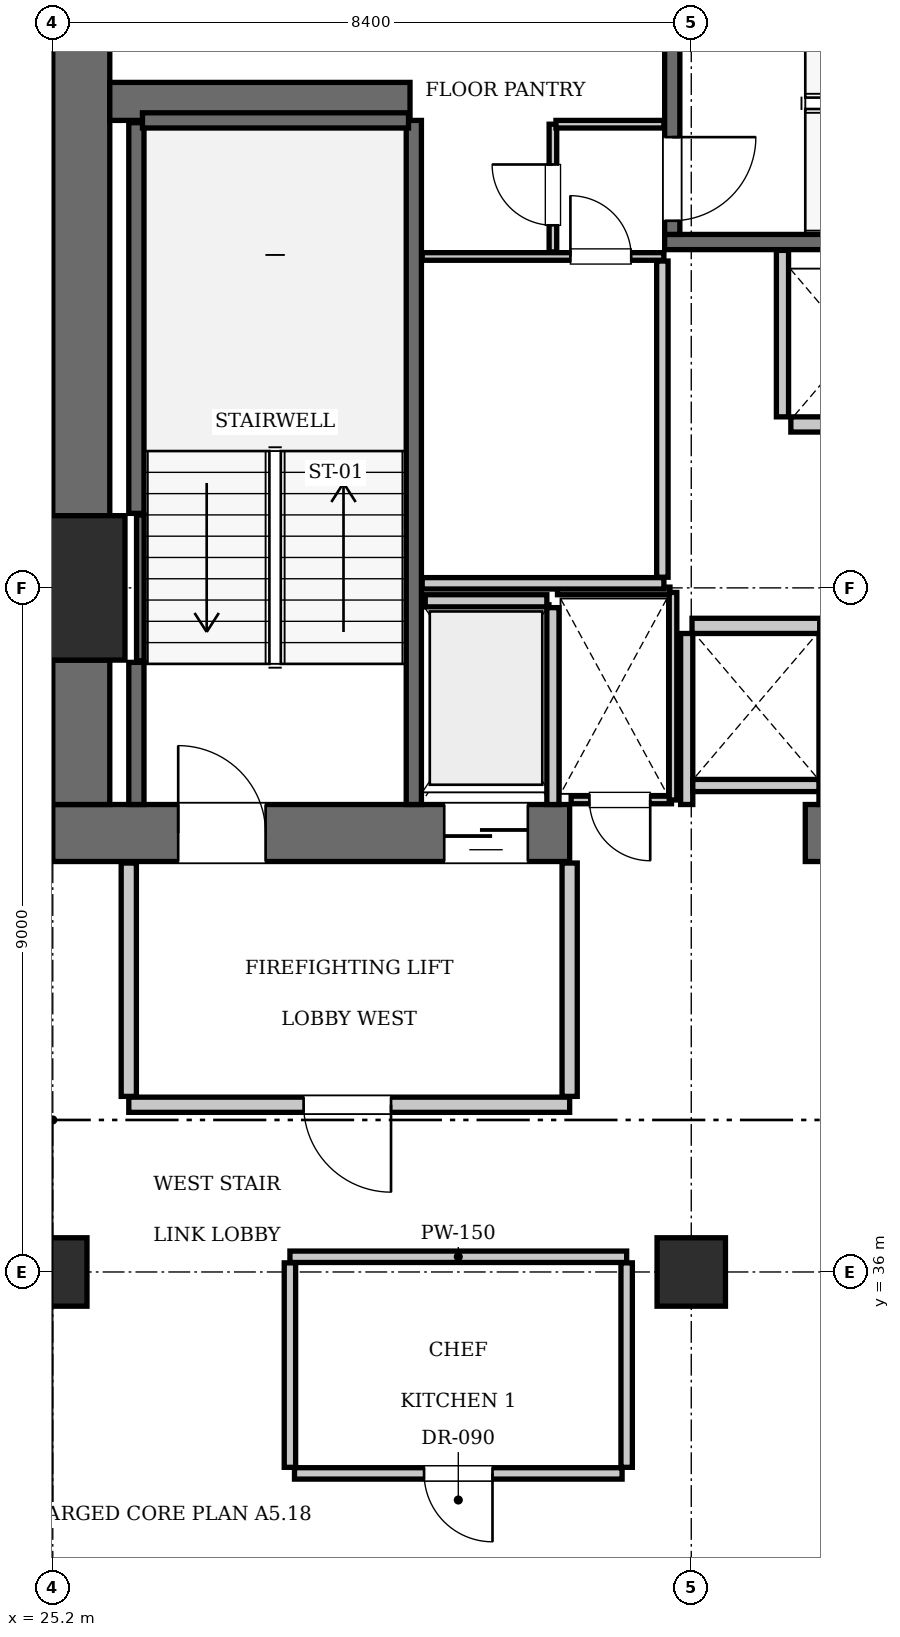
"""IFC4 building model, lengths in metres.
Left out: names, types, materials, properties, quantities, classifications, styles, units other than length and angle.
Written with IfcOpenShell. Run it as: python <this file> out.ifc"""

import sys

from ifc_helpers import new_model, si_unit, direction, frame, frame_2d, origin, origin_2d, place, context, subcontext, project, spatial, rectangle, extrude, element, fill, save


model = new_model("IFC4")
c1 = context("Model", 3, precision=1e-05, world=origin(), true_north=direction((0.0, 1.0)))
c2 = subcontext(c1, "Body", "Model", "MODEL_VIEW")
j1 = project(units=[si_unit("LENGTHUNIT", "METRE"), si_unit("PLANEANGLEUNIT", "RADIAN")], contexts=[c1])
p1 = place(None, origin())
s1 = spatial("IfcSite", under=j1, at=p1, CompositionType="ELEMENT")
p2 = place(p1, origin())
s2 = spatial("IfcBuilding", under=s1, at=p2, CompositionType="ELEMENT")
p3 = place(p2, frame((0.0, 0.0, 165.9)))
s3 = spatial("IfcBuildingStorey", under=s2, at=p3, CompositionType="ELEMENT", Elevation=165.9)
p4 = place(p3, frame((25.2, 45.0, 0.0), z_axis=(0.0, 0.0, 1.0), x_axis=(1.0, 0.0, 0.0)))
e1 = element("IfcColumn", 1, at=p4, inside=s3, PredefinedType="COLUMN", context=c2, shape_type="SweptSolid", body=[
    extrude(rectangle(XDim=1.9, YDim=1.9, at=origin_2d()), origin(), (0.0, 0.0, 1.0), 3.85),
])
p5 = place(p3, frame((25.2, 41.775, 0.0), z_axis=(0.0, 0.0, 1.0), x_axis=(1.0, 0.0, 0.0)))
e2 = element("IfcWall", 2, at=p5, inside=s3, PredefinedType="SHEAR", context=c2, shape_type="SweptSolid", body=[
    extrude(rectangle(XDim=6.8, YDim=0.75, at=frame_2d((3.4, 0.0))), origin(), (0.0, 0.0, 1.0), 3.85),
])
p6 = place(p5, frame((1.65, 0.0, 0.0)))
e3 = element("IfcOpeningElement", 3, at=p6, cuts=e2, PredefinedType="OPENING", context=c2, shape_type="SweptSolid", body=[
    extrude(rectangle(XDim=1.15, YDim=2.15, at=frame_2d((0.575, 1.075))), frame((0.0, 0.385, 0.0), z_axis=(0.0, -1.0, 0.0), x_axis=(1.0, 0.0, 0.0)), (0.0, 0.0, 1.0), 0.77),
])
p7 = place(p5, frame((5.15, 0.0, 0.0)))
e4 = element("IfcOpeningElement", 4, at=p7, cuts=e2, PredefinedType="OPENING", context=c2, shape_type="SweptSolid", body=[
    extrude(rectangle(XDim=1.1, YDim=2.2, at=frame_2d((0.55, 1.1))), frame((0.0, 0.385, 0.0), z_axis=(0.0, -1.0, 0.0), x_axis=(1.0, 0.0, 0.0)), (0.0, 0.0, 1.0), 0.77),
])
p8 = place(p3, frame((35.1, 41.775, 0.0), z_axis=(0.0, 0.0, 1.0), x_axis=(1.0, 0.0, 0.0)))
e5 = element("IfcWall", 5, at=p8, inside=s3, PredefinedType="SHEAR", context=c2, shape_type="SweptSolid", body=[
    extrude(rectangle(XDim=5.4, YDim=0.75, at=frame_2d((2.7, 0.0))), origin(), (0.0, 0.0, 1.0), 3.85),
])
p9 = place(p3, frame((25.575, 42.15, 0.0), z_axis=(0.0, 0.0, 1.0), x_axis=(0.0, 1.0, 0.0)))
e6 = element("IfcWall", 6, at=p9, inside=s3, PredefinedType="SHEAR", context=c2, shape_type="SweptSolid", body=[
    extrude(rectangle(XDim=1.9, YDim=0.75, at=frame_2d((0.95, 0.0))), origin(), (0.0, 0.0, 1.0), 3.85),
])
p10 = place(p3, frame((25.575, 45.95, 0.0), z_axis=(0.0, 0.0, 1.0), x_axis=(0.0, 1.0, 0.0)))
e7 = element("IfcWall", 7, at=p10, inside=s3, PredefinedType="SHEAR", context=c2, shape_type="SweptSolid", body=[
    extrude(rectangle(XDim=7.3, YDim=0.75, at=frame_2d((3.65, 0.0))), origin(), (0.0, 0.0, 1.0), 3.85),
])
p11 = place(p3, frame((25.95, 51.4, 0.0), z_axis=(0.0, 0.0, 1.0), x_axis=(1.0, 0.0, 0.0)))
e8 = element("IfcWall", 8, at=p11, inside=s3, PredefinedType="SHEAR", context=c2, shape_type="SweptSolid", body=[
    extrude(rectangle(XDim=3.95, YDim=0.5, at=frame_2d((1.975, 0.0))), origin(), (0.0, 0.0, 1.0), 3.85),
])
for number, where, z_axis, x_axis in (
    (9, (25.2, 36.0, 0.0), (0.0, 0.0, 1.0), (1.0, 0.0, 0.0)),
    (10, (33.6, 36.0, 0.0), (0.0, 0.0, 1.0), (1.0, 0.0, 0.0)),
):
    element("IfcColumn", number, at=place(p3, frame(where, z_axis=z_axis, x_axis=x_axis)), inside=s3, PredefinedType="COLUMN", context=c2, shape_type="SweptSolid", body=[
        extrude(rectangle(XDim=0.9, YDim=0.9, at=origin_2d()), origin(), (0.0, 0.0, 1.0), 3.85),
    ])
p12 = place(p3, frame((29.95, 42.15, 0.0), z_axis=(0.0, 0.0, 1.0), x_axis=(0.0, 1.0, 0.0)))
e11 = element("IfcWall", 11, at=p12, inside=s3, PredefinedType="SOLIDWALL", context=c2, shape_type="SweptSolid", body=[
    extrude(rectangle(XDim=9.0, YDim=0.2, at=frame_2d((4.5, 0.0))), origin(), (0.0, 0.0, 1.0), 3.61),
])
p13 = place(p3, frame((26.3, 42.15, 0.0), z_axis=(0.0, 0.0, 1.0), x_axis=(0.0, 1.0, 0.0)))
e12 = element("IfcWall", 12, at=p13, inside=s3, PredefinedType="SOLIDWALL", context=c2, shape_type="SweptSolid", body=[
    extrude(rectangle(XDim=1.87, YDim=0.2, at=frame_2d((0.935, 0.0))), origin(), (0.0, 0.0, 1.0), 3.61),
])
p14 = place(p3, frame((26.3, 45.98, 0.0), z_axis=(0.0, 0.0, 1.0), x_axis=(0.0, 1.0, 0.0)))
e13 = element("IfcWall", 13, at=p14, inside=s3, PredefinedType="SOLIDWALL", context=c2, shape_type="SweptSolid", body=[
    extrude(rectangle(XDim=5.14, YDim=0.2, at=frame_2d((2.57, 0.0))), origin(), (0.0, 0.0, 1.0), 3.61),
])
p15 = place(p3, frame((26.38, 51.15, 0.0), z_axis=(0.0, 0.0, 1.0), x_axis=(1.0, 0.0, 0.0)))
e14 = element("IfcWall", 14, at=p15, inside=s3, PredefinedType="SOLIDWALL", context=c2, shape_type="SweptSolid", body=[
    extrude(rectangle(XDim=3.5, YDim=0.2, at=frame_2d((1.75, 0.0))), origin(), (0.0, 0.0, 1.0), 3.61),
])
p16 = place(p3, frame((26.352, 44.04, 0.0), z_axis=(0.0, 0.0, 1.0), x_axis=(0.0, 1.0, 0.0)))
e15 = element("IfcWall", 15, at=p16, inside=s3, PredefinedType="SOLIDWALL", context=c2, shape_type="SweptSolid", body=[
    extrude(rectangle(XDim=1.92, YDim=0.1, at=frame_2d((0.96, 0.0))), origin(), (0.0, 0.0, 1.0), 3.61),
])
p17 = place(p3, frame((33.25, 49.55, 0.0), z_axis=(0.0, 0.0, 1.0), x_axis=(1.0, 0.0, 0.0)))
e16 = element("IfcWall", 16, at=p17, inside=s3, PredefinedType="SOLIDWALL", context=c2, shape_type="SweptSolid", body=[
    extrude(rectangle(XDim=9.1, YDim=0.2, at=frame_2d((4.55, 0.0))), origin(), (0.0, 0.0, 1.0), 3.61),
])
p18 = place(p3, frame((33.35, 49.65, 0.0), z_axis=(0.0, 0.0, 1.0), x_axis=(0.0, 1.0, 0.0)))
e17 = element("IfcWall", 17, at=p18, inside=s3, PredefinedType="SOLIDWALL", context=c2, shape_type="SweptSolid", body=[
    extrude(rectangle(XDim=3.6, YDim=0.2, at=frame_2d((1.8, 0.0))), origin(), (0.0, 0.0, 1.0), 3.61),
])
p19 = place(p18, frame((0.18, 0.0, 0.0)))
e18 = element("IfcOpeningElement", 18, at=p19, cuts=e17, PredefinedType="OPENING", context=c2, shape_type="SweptSolid", body=[
    extrude(rectangle(XDim=1.1, YDim=2.15, at=frame_2d((0.55, 1.075))), frame((0.0, 0.11, 0.0), z_axis=(0.0, -1.0, 0.0), x_axis=(1.0, 0.0, 0.0)), (0.0, 0.0, 1.0), 0.22),
])
p20 = place(p3, frame((34.91, 47.15, 0.0), z_axis=(0.0, 0.0, 1.0), x_axis=(1.0, 0.0, 0.0)))
e19 = element("IfcWall", 19, at=p20, inside=s3, PredefinedType="SOLIDWALL", context=c2, shape_type="SweptSolid", body=[
    extrude(rectangle(XDim=1.68, YDim=0.2, at=frame_2d((0.84, 0.0))), origin(), (0.0, 0.0, 1.0), 3.61),
])
p21 = place(p3, frame((33.61, 44.5, 0.0), z_axis=(0.0, 0.0, 1.0), x_axis=(1.0, 0.0, 0.0)))
e20 = element("IfcWall", 20, at=p21, inside=s3, PredefinedType="SOLIDWALL", context=c2, shape_type="SweptSolid", body=[
    extrude(rectangle(XDim=1.68, YDim=0.2, at=frame_2d((0.84, 0.0))), origin(), (0.0, 0.0, 1.0), 3.61),
])
p22 = place(p3, frame((30.1, 44.83, 0.0), z_axis=(0.0, 0.0, 1.0), x_axis=(1.0, 0.0, 0.0)))
e21 = element("IfcWall", 21, at=p22, inside=s3, PredefinedType="SOLIDWALL", context=c2, shape_type="SweptSolid", body=[
    extrude(rectangle(XDim=1.6, YDim=0.16, at=frame_2d((0.8, 0.0))), origin(), (0.0, 0.0, 1.0), 3.61),
])
p23 = place(p3, frame((31.78, 42.15, 0.0), z_axis=(0.0, 0.0, 1.0), x_axis=(0.0, 1.0, 0.0)))
e22 = element("IfcWall", 22, at=p23, inside=s3, PredefinedType="SOLIDWALL", context=c2, shape_type="SweptSolid", body=[
    extrude(rectangle(XDim=2.59, YDim=0.16, at=frame_2d((1.295, 0.0))), origin(), (0.0, 0.0, 1.0), 3.61),
])
p24 = place(p3, frame((34.8, 47.25, 0.0), z_axis=(0.0, 0.0, 1.0), x_axis=(0.0, 1.0, 0.0)))
e23 = element("IfcWall", 23, at=p24, inside=s3, PredefinedType="SOLIDWALL", context=c2, shape_type="SweptSolid", body=[
    extrude(rectangle(XDim=2.19, YDim=0.16, at=frame_2d((1.095, 0.0))), origin(), (0.0, 0.0, 1.0), 3.61),
])
for number, where, z_axis, x_axis in (
    (24, (33.54, 42.15, 0.0), (0.0, 0.0, 1.0), (0.0, 1.0, 0.0)),
    (25, (35.36, 42.15, 0.0), (0.0, 0.0, 1.0), (0.0, 1.0, 0.0)),
):
    element("IfcWall", number, at=place(p3, frame(where, z_axis=z_axis, x_axis=x_axis)), inside=s3, PredefinedType="SOLIDWALL", context=c2, shape_type="SweptSolid", body=[
        extrude(rectangle(XDim=2.25, YDim=0.16, at=frame_2d((1.125, 0.0))), origin(), (0.0, 0.0, 1.0), 3.61),
    ])
p25 = place(p3, frame((33.62, 42.4, 0.0), z_axis=(0.0, 0.0, 1.0), x_axis=(1.0, 0.0, 0.0)))
e26 = element("IfcWall", 26, at=p25, inside=s3, PredefinedType="SOLIDWALL", context=c2, shape_type="SweptSolid", body=[
    extrude(rectangle(XDim=1.66, YDim=0.16, at=frame_2d((0.83, 0.0))), origin(), (0.0, 0.0, 1.0), 3.61),
])
p26 = place(p3, frame((26.2, 38.2, 0.0), z_axis=(0.0, 0.0, 1.0), x_axis=(1.0, 0.0, 0.0)))
e27 = element("IfcWall", 27, at=p26, inside=s3, PredefinedType="PARTITIONING", context=c2, shape_type="SweptSolid", body=[
    extrude(rectangle(XDim=5.8, YDim=0.2, at=frame_2d((2.9, 0.0))), origin(), (0.0, 0.0, 1.0), 3.61),
])
p27 = place(p26, frame((2.3, 0.0, 0.0)))
e28 = element("IfcOpeningElement", 28, at=p27, cuts=e27, PredefinedType="OPENING", context=c2, shape_type="SweptSolid", body=[
    extrude(rectangle(XDim=1.15, YDim=2.15, at=frame_2d((0.575, 1.075))), frame((0.0, 0.11, 0.0), z_axis=(0.0, -1.0, 0.0), x_axis=(1.0, 0.0, 0.0)), (0.0, 0.0, 1.0), 0.22),
])
for number, where, z_axis, x_axis in (
    (29, (26.2, 38.31, 0.0), (0.0, 0.0, 1.0), (0.0, 1.0, 0.0)),
    (30, (32.0, 38.31, 0.0), (0.0, 0.0, 1.0), (0.0, 1.0, 0.0)),
):
    element("IfcWall", number, at=place(p3, frame(where, z_axis=z_axis, x_axis=x_axis)), inside=s3, PredefinedType="PARTITIONING", context=c2, shape_type="SweptSolid", body=[
        extrude(rectangle(XDim=3.07, YDim=0.2, at=frame_2d((1.535, 0.0))), origin(), (0.0, 0.0, 1.0), 3.61),
    ])
p28 = place(p3, frame((32.02, 42.21, 0.0), z_axis=(0.0, 0.0, 1.0), x_axis=(1.0, 0.0, 0.0)))
e31 = element("IfcWall", 31, at=p28, inside=s3, PredefinedType="PARTITIONING", context=c2, shape_type="SweptSolid", body=[
    extrude(rectangle(XDim=1.32, YDim=0.1, at=frame_2d((0.66, 0.0))), origin(), (0.0, 0.0, 1.0), 3.61),
])
p29 = place(p28, frame((0.24, 0.0, 0.0)))
e32 = element("IfcOpeningElement", 32, at=p29, cuts=e31, PredefinedType="OPENING", context=c2, shape_type="SweptSolid", body=[
    extrude(rectangle(XDim=0.8, YDim=2.05, at=frame_2d((0.4, 1.025))), frame((0.0, 0.06, 0.0), z_axis=(0.0, -1.0, 0.0), x_axis=(1.0, 0.0, 0.0)), (0.0, 0.0, 1.0), 0.12),
])
p30 = place(p3, frame((31.84, 44.96, 0.0), z_axis=(0.0, 0.0, 1.0), x_axis=(1.0, 0.0, 0.0)))
e33 = element("IfcWall", 33, at=p30, inside=s3, PredefinedType="PARTITIONING", context=c2, shape_type="SweptSolid", body=[
    extrude(rectangle(XDim=1.48, YDim=0.1, at=frame_2d((0.74, 0.0))), origin(), (0.0, 0.0, 1.0), 3.61),
])
p31 = place(p3, frame((33.36, 42.21, 0.0), z_axis=(0.0, 0.0, 1.0), x_axis=(0.0, 1.0, 0.0)))
e34 = element("IfcWall", 34, at=p31, inside=s3, PredefinedType="PARTITIONING", context=c2, shape_type="SweptSolid", body=[
    extrude(rectangle(XDim=2.73, YDim=0.1, at=frame_2d((1.365, 0.0))), origin(), (0.0, 0.0, 1.0), 3.61),
])
p32 = place(p3, frame((30.06, 45.06, 0.0), z_axis=(0.0, 0.0, 1.0), x_axis=(1.0, 0.0, 0.0)))
e35 = element("IfcWall", 35, at=p32, inside=s3, PredefinedType="PARTITIONING", context=c2, shape_type="SweptSolid", body=[
    extrude(rectangle(XDim=3.18, YDim=0.15, at=frame_2d((1.59, 0.0))), origin(), (0.0, 0.0, 1.0), 3.61),
])
p33 = place(p3, frame((33.22, 45.14, 0.0), z_axis=(0.0, 0.0, 1.0), x_axis=(0.0, 1.0, 0.0)))
e36 = element("IfcWall", 36, at=p33, inside=s3, PredefinedType="PARTITIONING", context=c2, shape_type="SweptSolid", body=[
    extrude(rectangle(XDim=4.16, YDim=0.15, at=frame_2d((2.08, 0.0))), origin(), (0.0, 0.0, 1.0), 3.61),
])
p34 = place(p3, frame((30.06, 49.36, 0.0), z_axis=(0.0, 0.0, 1.0), x_axis=(1.0, 0.0, 0.0)))
e37 = element("IfcWall", 37, at=p34, inside=s3, PredefinedType="PARTITIONING", context=c2, shape_type="SweptSolid", body=[
    extrude(rectangle(XDim=3.18, YDim=0.1, at=frame_2d((1.59, 0.0))), origin(), (0.0, 0.0, 1.0), 3.61),
])
p35 = place(p34, frame((1.95, 0.0, 0.0)))
e38 = element("IfcOpeningElement", 38, at=p35, cuts=e37, PredefinedType="OPENING", context=c2, shape_type="SweptSolid", body=[
    extrude(rectangle(XDim=0.8, YDim=2.05, at=frame_2d((0.4, 1.025))), frame((0.0, 0.06, 0.0), z_axis=(0.0, -1.0, 0.0), x_axis=(1.0, 0.0, 0.0)), (0.0, 0.0, 1.0), 0.12),
])
p36 = place(p3, frame((31.78, 49.42, 0.0), z_axis=(0.0, 0.0, 1.0), x_axis=(0.0, 1.0, 0.0)))
e39 = element("IfcWall", 39, at=p36, inside=s3, PredefinedType="PARTITIONING", context=c2, shape_type="SweptSolid", body=[
    extrude(rectangle(XDim=1.68, YDim=0.1, at=frame_2d((0.84, 0.0))), origin(), (0.0, 0.0, 1.0), 3.61),
])
p37 = place(p36, frame((0.35, 0.0, 0.0)))
e40 = element("IfcOpeningElement", 40, at=p37, cuts=e39, PredefinedType="OPENING", context=c2, shape_type="SweptSolid", body=[
    extrude(rectangle(XDim=0.8, YDim=2.05, at=frame_2d((0.4, 1.025))), frame((0.0, 0.06, 0.0), z_axis=(0.0, -1.0, 0.0), x_axis=(1.0, 0.0, 0.0)), (0.0, 0.0, 1.0), 0.12),
])
p38 = place(p3, frame((31.82, 51.1, 0.0), z_axis=(0.0, 0.0, 1.0), x_axis=(1.0, 0.0, 0.0)))
e41 = element("IfcWall", 41, at=p38, inside=s3, PredefinedType="PARTITIONING", context=c2, shape_type="SweptSolid", body=[
    extrude(rectangle(XDim=1.42, YDim=0.1, at=frame_2d((0.71, 0.0))), origin(), (0.0, 0.0, 1.0), 3.61),
])
p39 = place(p3, frame((28.32, 36.2, 0.0), z_axis=(0.0, 0.0, 1.0), x_axis=(1.0, 0.0, 0.0)))
e42 = element("IfcWall", 42, at=p39, inside=s3, PredefinedType="PARTITIONING", context=c2, shape_type="SweptSolid", body=[
    extrude(rectangle(XDim=4.43, YDim=0.15, at=frame_2d((2.215, 0.0))), origin(), (0.0, 0.0, 1.0), 3.61),
])
for number, where, z_axis, x_axis in (
    (43, (28.32, 33.43, 0.0), (0.0, 0.0, 1.0), (0.0, 1.0, 0.0)),
    (44, (32.75, 33.43, 0.0), (0.0, 0.0, 1.0), (0.0, 1.0, 0.0)),
):
    element("IfcWall", number, at=place(p3, frame(where, z_axis=z_axis, x_axis=x_axis)), inside=s3, PredefinedType="PARTITIONING", context=c2, shape_type="SweptSolid", body=[
        extrude(rectangle(XDim=2.69, YDim=0.15, at=frame_2d((1.345, 0.0))), origin(), (0.0, 0.0, 1.0), 3.61),
    ])
p40 = place(p3, frame((28.38, 33.35, 0.0), z_axis=(0.0, 0.0, 1.0), x_axis=(1.0, 0.0, 0.0)))
e45 = element("IfcWall", 45, at=p40, inside=s3, PredefinedType="PARTITIONING", context=c2, shape_type="SweptSolid", body=[
    extrude(rectangle(XDim=4.31, YDim=0.15, at=frame_2d((2.155, 0.0))), origin(), (0.0, 0.0, 1.0), 3.61),
])
p41 = place(p40, frame((1.705, 0.0, 0.0)))
e46 = element("IfcOpeningElement", 46, at=p41, cuts=e45, PredefinedType="OPENING", context=c2, shape_type="SweptSolid", body=[
    extrude(rectangle(XDim=0.9, YDim=2.1, at=frame_2d((0.45, 1.05))), frame((0.0, 0.085, 0.0), z_axis=(0.0, -1.0, 0.0), x_axis=(1.0, 0.0, 0.0)), (0.0, 0.0, 1.0), 0.17),
])
p42 = place(p6, origin())
e47 = element("IfcDoor", 47, at=p42, inside=s3, OperationType="SINGLE_SWING_LEFT", PredefinedType="DOOR", context=c2, shape_type="SweptSolid", body=[
    extrude(rectangle(XDim=1.15, YDim=2.15, at=frame_2d((0.575, 1.075))), frame((0.0, 0.025, 0.0), z_axis=(0.0, -1.0, 0.0), x_axis=(1.0, 0.0, 0.0)), (0.0, 0.0, 1.0), 0.05),
])
fill(e3, e47)
p43 = place(p19, frame((1.1, 0.0, 0.0), z_axis=(0.0, 0.0, 1.0), x_axis=(-1.0, 0.0, 0.0)))
e48 = element("IfcDoor", 48, at=p43, inside=s3, OperationType="SINGLE_SWING_LEFT", PredefinedType="DOOR", context=c2, shape_type="SweptSolid", body=[
    extrude(rectangle(XDim=1.1, YDim=2.15, at=frame_2d((0.55, 1.075))), frame((0.0, 0.025, 0.0), z_axis=(0.0, -1.0, 0.0), x_axis=(1.0, 0.0, 0.0)), (0.0, 0.0, 1.0), 0.05),
])
fill(e18, e48)
p44 = place(p7, frame((1.1, 0.0, 0.0), z_axis=(0.0, 0.0, 1.0), x_axis=(-1.0, 0.0, 0.0)))
e49 = element("IfcDoor", 49, at=p44, inside=s3, OperationType="SLIDING_TO_LEFT", PredefinedType="DOOR", context=c2, shape_type="SweptSolid", body=[
    extrude(rectangle(XDim=1.1, YDim=2.2, at=frame_2d((0.55, 1.1))), frame((0.0, 0.025, 0.0), z_axis=(0.0, -1.0, 0.0), x_axis=(1.0, 0.0, 0.0)), (0.0, 0.0, 1.0), 0.05),
])
fill(e4, e49)
p45 = place(p27, frame((1.15, 0.0, 0.0), z_axis=(0.0, 0.0, 1.0), x_axis=(-1.0, 0.0, 0.0)))
e50 = element("IfcDoor", 50, at=p45, inside=s3, OperationType="SINGLE_SWING_LEFT", PredefinedType="DOOR", context=c2, shape_type="SweptSolid", body=[
    extrude(rectangle(XDim=1.15, YDim=2.15, at=frame_2d((0.575, 1.075))), frame((0.0, 0.025, 0.0), z_axis=(0.0, -1.0, 0.0), x_axis=(1.0, 0.0, 0.0)), (0.0, 0.0, 1.0), 0.05),
])
fill(e28, e50)
p46 = place(p29, frame((0.8, 0.0, 0.0), z_axis=(0.0, 0.0, 1.0), x_axis=(-1.0, 0.0, 0.0)))
e51 = element("IfcDoor", 51, at=p46, inside=s3, OperationType="SINGLE_SWING_LEFT", PredefinedType="DOOR", context=c2, shape_type="SweptSolid", body=[
    extrude(rectangle(XDim=0.8, YDim=2.05, at=frame_2d((0.4, 1.025))), frame((0.0, 0.025, 0.0), z_axis=(0.0, -1.0, 0.0), x_axis=(1.0, 0.0, 0.0)), (0.0, 0.0, 1.0), 0.05),
])
fill(e32, e51)
p47 = place(p35, origin())
e52 = element("IfcDoor", 52, at=p47, inside=s3, OperationType="SINGLE_SWING_LEFT", PredefinedType="DOOR", context=c2, shape_type="SweptSolid", body=[
    extrude(rectangle(XDim=0.8, YDim=2.05, at=frame_2d((0.4, 1.025))), frame((0.0, 0.025, 0.0), z_axis=(0.0, -1.0, 0.0), x_axis=(1.0, 0.0, 0.0)), (0.0, 0.0, 1.0), 0.05),
])
fill(e38, e52)
p48 = place(p37, origin())
e53 = element("IfcDoor", 53, at=p48, inside=s3, OperationType="SINGLE_SWING_RIGHT", PredefinedType="DOOR", context=c2, shape_type="SweptSolid", body=[
    extrude(rectangle(XDim=0.8, YDim=2.05, at=frame_2d((0.4, 1.025))), frame((0.0, 0.025, 0.0), z_axis=(0.0, -1.0, 0.0), x_axis=(1.0, 0.0, 0.0)), (0.0, 0.0, 1.0), 0.05),
])
fill(e40, e53)
p49 = place(p41, frame((0.9, 0.0, 0.0), z_axis=(0.0, 0.0, 1.0), x_axis=(-1.0, 0.0, 0.0)))
e54 = element("IfcDoor", 54, at=p49, inside=s3, OperationType="SINGLE_SWING_LEFT", PredefinedType="DOOR", context=c2, shape_type="SweptSolid", body=[
    extrude(rectangle(XDim=0.9, YDim=2.1, at=frame_2d((0.45, 1.05))), frame((0.0, 0.025, 0.0), z_axis=(0.0, -1.0, 0.0), x_axis=(1.0, 0.0, 0.0)), (0.0, 0.0, 1.0), 0.05),
])
fill(e46, e54)
save(model, sys.argv[1])
